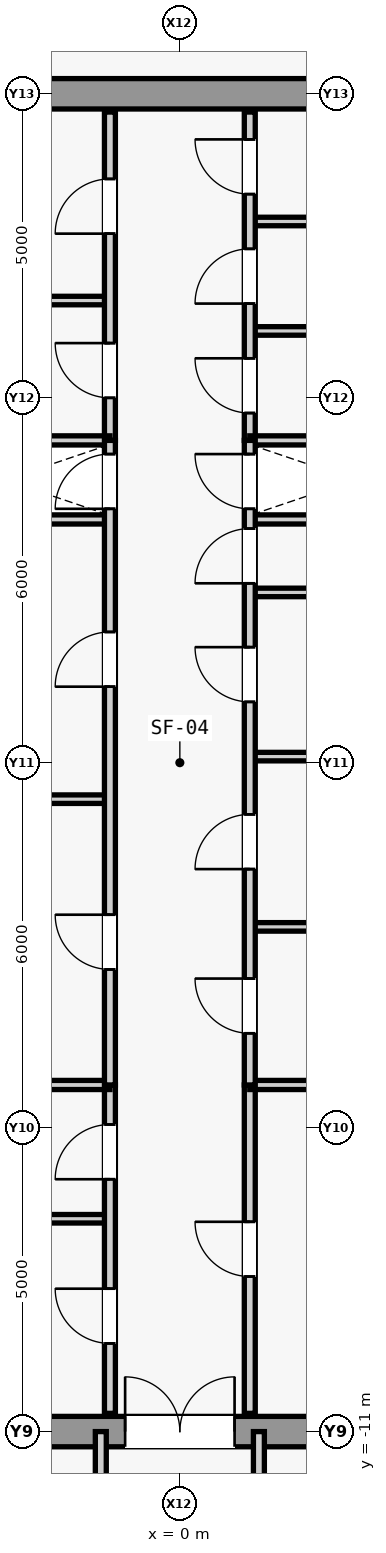
"""IFC4 building model, lengths in metres.
Left out: names, types, materials, properties, quantities, classifications, styles, units other than length and angle.
Written with IfcOpenShell. Run it as: python <this file> out.ifc"""

import sys

from ifc_helpers import new_model, si_unit, direction, frame, frame_2d, origin, place, context, subcontext, project, spatial, rectangle, extrude, source, transform, mapped, element, fill, save


model = new_model("IFC4")
c1 = context("Model", 3, precision=1e-05, world=origin(), true_north=direction((0.0, 1.0)))
c2 = subcontext(c1, "Body", "Model", "MODEL_VIEW")
j1 = project(units=[si_unit("LENGTHUNIT", "METRE"), si_unit("PLANEANGLEUNIT", "RADIAN")], contexts=[c1])
p1 = place(None, origin())
s1 = spatial("IfcSite", under=j1, at=p1, CompositionType="ELEMENT")
p2 = place(p1, origin())
s2 = spatial("IfcBuilding", under=s1, at=p2, CompositionType="ELEMENT")
p3 = place(p2, frame((0.0, 0.0, 289.5)))
s3 = spatial("IfcBuildingStorey", under=s2, at=p3, CompositionType="ELEMENT", Elevation=289.5)
m1 = source(origin(), c2, "Body", "SweptSolid", [
    extrude(rectangle(XDim=9.2, YDim=0.5, at=frame_2d((4.6, 0.0))), origin(), (0.0, 0.0, 1.0), 3.78),
])
p4 = place(p3, frame((-4.6, -11.0, 0.0), z_axis=(0.0, 0.0, 1.0), x_axis=(1.0, 0.0, 0.0)))
e1 = element("IfcWall", 1, at=p4, inside=s3, PredefinedType="SHEAR", context=c2, shape_type="MappedRepresentation", body=[
    mapped(m1, transform((0.0, 0.0, 0.0), scale=1.0)),
])
m2 = source(origin(), c2, "Body", "SweptSolid", [
    extrude(rectangle(XDim=1.8, YDim=2.25, at=frame_2d((0.9, 1.125))), frame((0.0, 0.26, 0.0), z_axis=(0.0, -1.0, 0.0), x_axis=(1.0, 0.0, 0.0)), (0.0, 0.0, 1.0), 0.52),
])
p5 = place(p4, frame((3.7, 0.0, 0.0)))
e2 = element("IfcOpeningElement", 2, at=p5, cuts=e1, PredefinedType="OPENING", context=c2, shape_type="MappedRepresentation", body=[
    mapped(m2, transform((0.0, 0.0, 0.0), scale=1.0)),
])
p6 = place(p3, frame((-4.6, 11.0, 0.0), z_axis=(0.0, 0.0, 1.0), x_axis=(1.0, 0.0, 0.0)))
e3 = element("IfcWall", 3, at=p6, inside=s3, PredefinedType="SHEAR", context=c2, shape_type="MappedRepresentation", body=[
    mapped(m1, transform((0.0, 0.0, 0.0), scale=1.0)),
])
m3 = source(origin(), c2, "Body", "SweptSolid", [
    extrude(rectangle(XDim=3.45, YDim=0.15, at=frame_2d((1.725, 0.0))), origin(), (0.0, 0.0, 1.0), 3.78),
])
for number, where, z_axis, x_axis in (
    (4, (-4.6, 4.0, 0.0), (0.0, 0.0, 1.0), (1.0, 0.0, 0.0)),
    (5, (1.15, 4.0, 0.0), (0.0, 0.0, 1.0), (1.0, 0.0, 0.0)),
):
    element("IfcWall", number, at=place(p3, frame(where, z_axis=z_axis, x_axis=x_axis)), inside=s3, PredefinedType="PARTITIONING", context=c2, shape_type="MappedRepresentation", body=[
        mapped(m3, transform((0.0, 0.0, 0.0), scale=1.0)),
    ])
m4 = source(origin(), c2, "Body", "SweptSolid", [
    extrude(rectangle(XDim=3.45, YDim=0.14, at=frame_2d((1.725, 0.0))), origin(), (0.0, 0.0, 1.0), 3.78),
])
p7 = place(p3, frame((-4.6, -7.5, 0.0), z_axis=(0.0, 0.0, 1.0), x_axis=(1.0, 0.0, 0.0)))
e6 = element("IfcWall", 6, at=p7, inside=s3, PredefinedType="PARTITIONING", context=c2, shape_type="MappedRepresentation", body=[
    mapped(m4, transform((0.0, 0.0, 0.0), scale=1.0)),
])
m5 = source(origin(), c2, "Body", "SweptSolid", [
    extrude(rectangle(XDim=5.4, YDim=0.18, at=frame_2d((2.7, 0.0))), origin(), (0.0, 0.0, 1.0), 3.78),
])
p8 = place(p3, frame((-1.15, -10.7, 0.0), z_axis=(0.0, 0.0, 1.0), x_axis=(0.0, 1.0, 0.0)))
e7 = element("IfcWall", 7, at=p8, inside=s3, PredefinedType="PARTITIONING", context=c2, shape_type="MappedRepresentation", body=[
    mapped(m5, transform((0.0, 0.0, 0.0), scale=1.0)),
])
m6 = source(origin(), c2, "Body", "SweptSolid", [
    extrude(rectangle(XDim=0.9, YDim=2.15, at=frame_2d((0.45, 1.075))), frame((0.0, 0.1, 0.0), z_axis=(0.0, -1.0, 0.0), x_axis=(1.0, 0.0, 0.0)), (0.0, 0.0, 1.0), 0.2),
])
p9 = place(p8, frame((1.15, 0.0, 0.0)))
e8 = element("IfcOpeningElement", 8, at=p9, cuts=e7, PredefinedType="OPENING", context=c2, shape_type="MappedRepresentation", body=[
    mapped(m6, transform((0.0, 0.0, 0.0), scale=1.0)),
])
p10 = place(p8, frame((3.85, 0.0, 0.0)))
e9 = element("IfcOpeningElement", 9, at=p10, cuts=e7, PredefinedType="OPENING", context=c2, shape_type="MappedRepresentation", body=[
    mapped(m6, transform((0.0, 0.0, 0.0), scale=1.0)),
])
p11 = place(p3, frame((1.15, -10.7, 0.0), z_axis=(0.0, 0.0, 1.0), x_axis=(0.0, 1.0, 0.0)))
e10 = element("IfcWall", 10, at=p11, inside=s3, PredefinedType="PARTITIONING", context=c2, shape_type="MappedRepresentation", body=[
    mapped(m5, transform((0.0, 0.0, 0.0), scale=1.0)),
])
p12 = place(p11, frame((2.25, 0.0, 0.0)))
e11 = element("IfcOpeningElement", 11, at=p12, cuts=e10, PredefinedType="OPENING", context=c2, shape_type="MappedRepresentation", body=[
    mapped(m6, transform((0.0, 0.0, 0.0), scale=1.0)),
])
for number, where, z_axis, x_axis in (
    (12, (-4.6, -5.3, 0.0), (0.0, 0.0, 1.0), (1.0, 0.0, 0.0)),
    (13, (1.15, -5.3, 0.0), (0.0, 0.0, 1.0), (1.0, 0.0, 0.0)),
):
    element("IfcWall", number, at=place(p3, frame(where, z_axis=z_axis, x_axis=x_axis)), inside=s3, PredefinedType="PARTITIONING", context=c2, shape_type="MappedRepresentation", body=[
        mapped(m3, transform((0.0, 0.0, 0.0), scale=1.0)),
    ])
p13 = place(p3, frame((-4.6, 7.6, 0.0), z_axis=(0.0, 0.0, 1.0), x_axis=(1.0, 0.0, 0.0)))
e14 = element("IfcWall", 14, at=p13, inside=s3, PredefinedType="PARTITIONING", context=c2, shape_type="MappedRepresentation", body=[
    mapped(m4, transform((0.0, 0.0, 0.0), scale=1.0)),
])
p14 = place(p3, frame((-1.15, 5.3, 0.0), z_axis=(0.0, 0.0, 1.0), x_axis=(0.0, 1.0, 0.0)))
e15 = element("IfcWall", 15, at=p14, inside=s3, PredefinedType="PARTITIONING", context=c2, shape_type="MappedRepresentation", body=[
    mapped(m5, transform((0.0, 0.0, 0.0), scale=1.0)),
])
p15 = place(p14, frame((0.7, 0.0, 0.0)))
e16 = element("IfcOpeningElement", 16, at=p15, cuts=e15, PredefinedType="OPENING", context=c2, shape_type="MappedRepresentation", body=[
    mapped(m6, transform((0.0, 0.0, 0.0), scale=1.0)),
])
p16 = place(p14, frame((3.4, 0.0, 0.0)))
e17 = element("IfcOpeningElement", 17, at=p16, cuts=e15, PredefinedType="OPENING", context=c2, shape_type="MappedRepresentation", body=[
    mapped(m6, transform((0.0, 0.0, 0.0), scale=1.0)),
])
for number, where, z_axis, x_axis in (
    (18, (1.15, 7.1, 0.0), (0.0, 0.0, 1.0), (1.0, 0.0, 0.0)),
    (19, (1.15, 8.9, 0.0), (0.0, 0.0, 1.0), (1.0, 0.0, 0.0)),
):
    element("IfcWall", number, at=place(p3, frame(where, z_axis=z_axis, x_axis=x_axis)), inside=s3, PredefinedType="PARTITIONING", context=c2, shape_type="MappedRepresentation", body=[
        mapped(m4, transform((0.0, 0.0, 0.0), scale=1.0)),
    ])
p17 = place(p3, frame((1.15, 5.3, 0.0), z_axis=(0.0, 0.0, 1.0), x_axis=(0.0, 1.0, 0.0)))
e20 = element("IfcWall", 20, at=p17, inside=s3, PredefinedType="PARTITIONING", context=c2, shape_type="MappedRepresentation", body=[
    mapped(m5, transform((0.0, 0.0, 0.0), scale=1.0)),
])
p18 = place(p17, frame((0.45, 0.0, 0.0)))
e21 = element("IfcOpeningElement", 21, at=p18, cuts=e20, PredefinedType="OPENING", context=c2, shape_type="MappedRepresentation", body=[
    mapped(m6, transform((0.0, 0.0, 0.0), scale=1.0)),
])
p19 = place(p17, frame((2.25, 0.0, 0.0)))
e22 = element("IfcOpeningElement", 22, at=p19, cuts=e20, PredefinedType="OPENING", context=c2, shape_type="MappedRepresentation", body=[
    mapped(m6, transform((0.0, 0.0, 0.0), scale=1.0)),
])
p20 = place(p17, frame((4.05, 0.0, 0.0)))
e23 = element("IfcOpeningElement", 23, at=p20, cuts=e20, PredefinedType="OPENING", context=c2, shape_type="MappedRepresentation", body=[
    mapped(m6, transform((0.0, 0.0, 0.0), scale=1.0)),
])
for number, where, z_axis, x_axis in (
    (24, (-4.6, 5.3, 0.0), (0.0, 0.0, 1.0), (1.0, 0.0, 0.0)),
    (25, (1.15, 5.3, 0.0), (0.0, 0.0, 1.0), (1.0, 0.0, 0.0)),
):
    element("IfcWall", number, at=place(p3, frame(where, z_axis=z_axis, x_axis=x_axis)), inside=s3, PredefinedType="PARTITIONING", context=c2, shape_type="MappedRepresentation", body=[
        mapped(m3, transform((0.0, 0.0, 0.0), scale=1.0)),
    ])
p21 = place(p3, frame((-4.6, -0.6, 0.0), z_axis=(0.0, 0.0, 1.0), x_axis=(1.0, 0.0, 0.0)))
e26 = element("IfcWall", 26, at=p21, inside=s3, PredefinedType="PARTITIONING", context=c2, shape_type="MappedRepresentation", body=[
    mapped(m4, transform((0.0, 0.0, 0.0), scale=1.0)),
])
m7 = source(origin(), c2, "Body", "SweptSolid", [
    extrude(rectangle(XDim=10.6, YDim=0.18, at=frame_2d((5.3, 0.0))), origin(), (0.0, 0.0, 1.0), 3.78),
])
p22 = place(p3, frame((-1.15, -5.3, 0.0), z_axis=(0.0, 0.0, 1.0), x_axis=(0.0, 1.0, 0.0)))
e27 = element("IfcWall", 27, at=p22, inside=s3, PredefinedType="PARTITIONING", context=c2, shape_type="MappedRepresentation", body=[
    mapped(m7, transform((0.0, 0.0, 0.0), scale=1.0)),
])
p23 = place(p22, frame((1.9, 0.0, 0.0)))
e28 = element("IfcOpeningElement", 28, at=p23, cuts=e27, PredefinedType="OPENING", context=c2, shape_type="MappedRepresentation", body=[
    mapped(m6, transform((0.0, 0.0, 0.0), scale=1.0)),
])
p24 = place(p22, frame((6.55, 0.0, 0.0)))
e29 = element("IfcOpeningElement", 29, at=p24, cuts=e27, PredefinedType="OPENING", context=c2, shape_type="MappedRepresentation", body=[
    mapped(m6, transform((0.0, 0.0, 0.0), scale=1.0)),
])
p25 = place(p22, frame((9.475, 0.0, 0.0)))
e30 = element("IfcOpeningElement", 30, at=p25, cuts=e27, PredefinedType="OPENING", context=c2, shape_type="MappedRepresentation", body=[
    mapped(m6, transform((0.0, 0.0, 0.0), scale=1.0)),
])
p26 = place(p3, frame((1.15, -2.7, 0.0), z_axis=(0.0, 0.0, 1.0), x_axis=(1.0, 0.0, 0.0)))
e31 = element("IfcWall", 31, at=p26, inside=s3, PredefinedType="PARTITIONING", context=c2, shape_type="MappedRepresentation", body=[
    mapped(m4, transform((0.0, 0.0, 0.0), scale=1.0)),
])
m8 = source(origin(), c2, "Body", "SweptSolid", [
    extrude(rectangle(XDim=3.45, YDim=0.14, at=frame_2d((1.725, 0.0))), origin(), (0.0, 0.0, 1.0), 3.085),
])
p27 = place(p3, frame((1.15, 0.1, 0.0), z_axis=(0.0, 0.0, 1.0), x_axis=(1.0, 0.0, 0.0)))
e32 = element("IfcWall", 32, at=p27, inside=s3, PredefinedType="PARTITIONING", context=c2, shape_type="MappedRepresentation", body=[
    mapped(m8, transform((0.0, 0.0, 0.0), scale=1.0)),
])
p28 = place(p3, frame((1.15, 2.8, 0.0), z_axis=(0.0, 0.0, 1.0), x_axis=(1.0, 0.0, 0.0)))
e33 = element("IfcWall", 33, at=p28, inside=s3, PredefinedType="PARTITIONING", context=c2, shape_type="MappedRepresentation", body=[
    mapped(m4, transform((0.0, 0.0, 0.0), scale=1.0)),
])
p29 = place(p3, frame((1.15, -5.3, 0.0), z_axis=(0.0, 0.0, 1.0), x_axis=(0.0, 1.0, 0.0)))
e34 = element("IfcWall", 34, at=p29, inside=s3, PredefinedType="PARTITIONING", context=c2, shape_type="MappedRepresentation", body=[
    mapped(m7, transform((0.0, 0.0, 0.0), scale=1.0)),
])
p30 = place(p29, frame((0.85, 0.0, 0.0)))
e35 = element("IfcOpeningElement", 35, at=p30, cuts=e34, PredefinedType="OPENING", context=c2, shape_type="MappedRepresentation", body=[
    mapped(m6, transform((0.0, 0.0, 0.0), scale=1.0)),
])
p31 = place(p29, frame((3.55, 0.0, 0.0)))
e36 = element("IfcOpeningElement", 36, at=p31, cuts=e34, PredefinedType="OPENING", context=c2, shape_type="MappedRepresentation", body=[
    mapped(m6, transform((0.0, 0.0, 0.0), scale=1.0)),
])
p32 = place(p29, frame((6.3, 0.0, 0.0)))
e37 = element("IfcOpeningElement", 37, at=p32, cuts=e34, PredefinedType="OPENING", context=c2, shape_type="MappedRepresentation", body=[
    mapped(m6, transform((0.0, 0.0, 0.0), scale=1.0)),
])
p33 = place(p29, frame((8.25, 0.0, 0.0)))
e38 = element("IfcOpeningElement", 38, at=p33, cuts=e34, PredefinedType="OPENING", context=c2, shape_type="MappedRepresentation", body=[
    mapped(m6, transform((0.0, 0.0, 0.0), scale=1.0)),
])
p34 = place(p29, frame((9.475, 0.0, 0.0)))
e39 = element("IfcOpeningElement", 39, at=p34, cuts=e34, PredefinedType="OPENING", context=c2, shape_type="MappedRepresentation", body=[
    mapped(m6, transform((0.0, 0.0, 0.0), scale=1.0)),
])
m9 = source(origin(), c2, "Body", "SweptSolid", [
    extrude(rectangle(XDim=3.2, YDim=0.18, at=frame_2d((1.6, 0.0))), origin(), (0.0, 0.0, 1.0), 3.78),
])
for number, where, z_axis, x_axis in (
    (40, (-1.3, -14.2, 0.0), (0.0, 0.0, 1.0), (0.0, 1.0, 0.0)),
    (41, (1.3, -14.2, 0.0), (0.0, 0.0, 1.0), (0.0, 1.0, 0.0)),
):
    element("IfcWall", number, at=place(p3, frame(where, z_axis=z_axis, x_axis=x_axis)), inside=s3, PredefinedType="PARTITIONING", context=c2, shape_type="MappedRepresentation", body=[
        mapped(m9, transform((0.0, 0.0, 0.0), scale=1.0)),
    ])
m10 = source(origin(), c2, "Body", "SweptSolid", [
    extrude(rectangle(XDim=0.9, YDim=2.15, at=frame_2d((0.45, 1.075))), frame((0.0, 0.025, 0.0), z_axis=(0.0, -1.0, 0.0), x_axis=(1.0, 0.0, 0.0)), (0.0, 0.0, 1.0), 0.05),
])
p35 = place(p9, origin())
e42 = element("IfcDoor", 42, at=p35, inside=s3, OperationType="SINGLE_SWING_RIGHT", PredefinedType="DOOR", context=c2, shape_type="MappedRepresentation", body=[
    mapped(m10, transform((0.0, 0.0, 0.0), scale=1.0)),
])
fill(e8, e42)
p36 = place(p10, origin())
e43 = element("IfcDoor", 43, at=p36, inside=s3, OperationType="SINGLE_SWING_LEFT", PredefinedType="DOOR", context=c2, shape_type="MappedRepresentation", body=[
    mapped(m10, transform((0.0, 0.0, 0.0), scale=1.0)),
])
fill(e9, e43)
p37 = place(p12, origin())
e44 = element("IfcDoor", 44, at=p37, inside=s3, OperationType="SINGLE_SWING_RIGHT", PredefinedType="DOOR", context=c2, shape_type="MappedRepresentation", body=[
    mapped(m10, transform((0.0, 0.0, 0.0), scale=1.0)),
])
fill(e11, e44)
m11 = source(origin(), c2, "Body", "SweptSolid", [
    extrude(rectangle(XDim=1.8, YDim=2.25, at=frame_2d((0.9, 1.125))), frame((0.0, 0.025, 0.0), z_axis=(0.0, -1.0, 0.0), x_axis=(1.0, 0.0, 0.0)), (0.0, 0.0, 1.0), 0.05),
])
p38 = place(p5, origin())
e45 = element("IfcDoor", 45, at=p38, inside=s3, OperationType="SINGLE_SWING_LEFT", PredefinedType="DOOR", context=c2, shape_type="MappedRepresentation", body=[
    mapped(m11, transform((0.0, 0.0, 0.0), scale=1.0)),
])
fill(e2, e45)
p39 = place(p15, origin())
e46 = element("IfcDoor", 46, at=p39, inside=s3, OperationType="SINGLE_SWING_RIGHT", PredefinedType="DOOR", context=c2, shape_type="MappedRepresentation", body=[
    mapped(m10, transform((0.0, 0.0, 0.0), scale=1.0)),
])
fill(e16, e46)
p40 = place(p16, origin())
e47 = element("IfcDoor", 47, at=p40, inside=s3, OperationType="SINGLE_SWING_LEFT", PredefinedType="DOOR", context=c2, shape_type="MappedRepresentation", body=[
    mapped(m10, transform((0.0, 0.0, 0.0), scale=1.0)),
])
fill(e17, e47)
p41 = place(p18, origin())
e48 = element("IfcDoor", 48, at=p41, inside=s3, OperationType="SINGLE_SWING_RIGHT", PredefinedType="DOOR", context=c2, shape_type="MappedRepresentation", body=[
    mapped(m10, transform((0.0, 0.0, 0.0), scale=1.0)),
])
fill(e21, e48)
p42 = place(p19, origin())
e49 = element("IfcDoor", 49, at=p42, inside=s3, OperationType="SINGLE_SWING_LEFT", PredefinedType="DOOR", context=c2, shape_type="MappedRepresentation", body=[
    mapped(m10, transform((0.0, 0.0, 0.0), scale=1.0)),
])
fill(e22, e49)
p43 = place(p20, origin())
e50 = element("IfcDoor", 50, at=p43, inside=s3, OperationType="SINGLE_SWING_RIGHT", PredefinedType="DOOR", context=c2, shape_type="MappedRepresentation", body=[
    mapped(m10, transform((0.0, 0.0, 0.0), scale=1.0)),
])
fill(e23, e50)
p44 = place(p23, origin())
e51 = element("IfcDoor", 51, at=p44, inside=s3, OperationType="SINGLE_SWING_RIGHT", PredefinedType="DOOR", context=c2, shape_type="MappedRepresentation", body=[
    mapped(m10, transform((0.0, 0.0, 0.0), scale=1.0)),
])
fill(e28, e51)
p45 = place(p24, origin())
e52 = element("IfcDoor", 52, at=p45, inside=s3, OperationType="SINGLE_SWING_LEFT", PredefinedType="DOOR", context=c2, shape_type="MappedRepresentation", body=[
    mapped(m10, transform((0.0, 0.0, 0.0), scale=1.0)),
])
fill(e29, e52)
p46 = place(p30, origin())
e53 = element("IfcDoor", 53, at=p46, inside=s3, OperationType="SINGLE_SWING_RIGHT", PredefinedType="DOOR", context=c2, shape_type="MappedRepresentation", body=[
    mapped(m10, transform((0.0, 0.0, 0.0), scale=1.0)),
])
fill(e35, e53)
p47 = place(p31, origin())
e54 = element("IfcDoor", 54, at=p47, inside=s3, OperationType="SINGLE_SWING_LEFT", PredefinedType="DOOR", context=c2, shape_type="MappedRepresentation", body=[
    mapped(m10, transform((0.0, 0.0, 0.0), scale=1.0)),
])
fill(e36, e54)
p48 = place(p32, origin())
e55 = element("IfcDoor", 55, at=p48, inside=s3, OperationType="SINGLE_SWING_RIGHT", PredefinedType="DOOR", context=c2, shape_type="MappedRepresentation", body=[
    mapped(m10, transform((0.0, 0.0, 0.0), scale=1.0)),
])
fill(e37, e55)
p49 = place(p33, origin())
e56 = element("IfcDoor", 56, at=p49, inside=s3, OperationType="SINGLE_SWING_LEFT", PredefinedType="DOOR", context=c2, shape_type="MappedRepresentation", body=[
    mapped(m10, transform((0.0, 0.0, 0.0), scale=1.0)),
])
fill(e38, e56)
p50 = place(p25, origin())
e57 = element("IfcDoor", 57, at=p50, inside=s3, OperationType="SINGLE_SWING_LEFT", PredefinedType="DOOR", context=c2, shape_type="MappedRepresentation", body=[
    mapped(m10, transform((0.0, 0.0, 0.0), scale=1.0)),
])
fill(e30, e57)
p51 = place(p34, origin())
e58 = element("IfcDoor", 58, at=p51, inside=s3, OperationType="SINGLE_SWING_RIGHT", PredefinedType="DOOR", context=c2, shape_type="MappedRepresentation", body=[
    mapped(m10, transform((0.0, 0.0, 0.0), scale=1.0)),
])
fill(e39, e58)
save(model, sys.argv[1])
